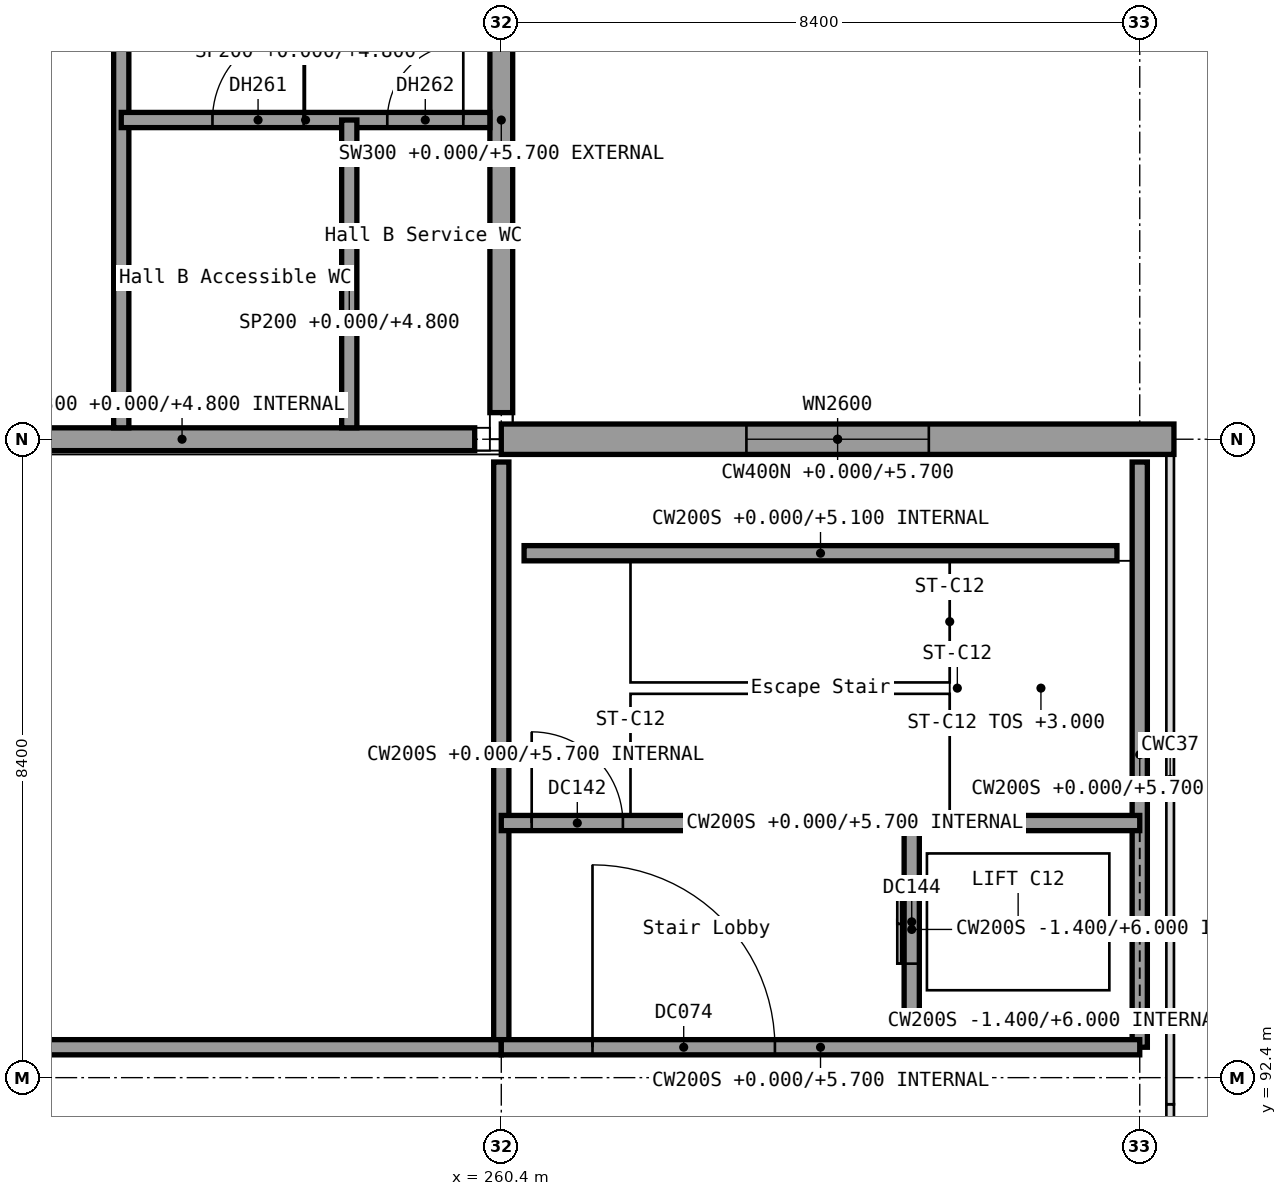
"""IFC4 building model, lengths in metres.
Left out: names, types, materials, properties, quantities, classifications, styles, units other than length and angle.
Written with IfcOpenShell. Run it as: python <this file> out.ifc"""

import sys

from ifc_helpers import new_model, si_unit, direction, frame, frame_2d, origin, origin_2d, place, context, subcontext, project, spatial, rectangle, extrude, element, fill, save


model = new_model("IFC4")
c1 = context("Model", 3, precision=1e-05, world=origin(), true_north=direction((0.0, 1.0)))
c2 = subcontext(c1, "Body", "Model", "MODEL_VIEW")
j1 = project(units=[si_unit("LENGTHUNIT", "METRE"), si_unit("PLANEANGLEUNIT", "RADIAN")], contexts=[c1])
p1 = place(None, origin())
s1 = spatial("IfcSite", under=j1, at=p1, CompositionType="ELEMENT")
p2 = place(p1, origin())
s2 = spatial("IfcBuilding", under=s1, at=p2, CompositionType="ELEMENT")
p3 = place(p2, origin())
s3 = spatial("IfcBuildingStorey", under=s2, at=p3, CompositionType="ELEMENT", Elevation=0.0)
p4 = place(p3, frame((260.4, 100.8, 0.0), z_axis=(0.0, 0.0, 1.0), x_axis=(1.0, 0.0, 0.0)))
e1 = element("IfcColumn", 1, at=p4, inside=s3, PredefinedType="COLUMN", context=c2, shape_type="SweptSolid", body=[
    extrude(rectangle(XDim=0.7, YDim=0.7, at=origin_2d()), origin(), (0.0, 0.0, 1.0), 4.8),
])
p5 = place(p3, frame((252.35, 100.8, 0.0), z_axis=(0.0, 0.0, 1.0), x_axis=(1.0, 0.0, 0.0)))
e2 = element("IfcWall", 2, at=p5, inside=s3, PredefinedType="SOLIDWALL", context=c2, shape_type="SweptSolid", body=[
    extrude(rectangle(XDim=7.7, YDim=0.3, at=frame_2d((3.85, 0.0))), origin(), (0.0, 0.0, 1.0), 4.8),
])
p6 = place(p3, frame((260.4, 101.15, 0.0), z_axis=(0.0, 0.0, 1.0), x_axis=(0.0, 1.0, 0.0)))
e3 = element("IfcWall", 3, at=p6, inside=s3, PredefinedType="SOLIDWALL", context=c2, shape_type="SweptSolid", body=[
    extrude(rectangle(XDim=7.7, YDim=0.3, at=frame_2d((3.85, 0.0))), origin(), (0.0, 0.0, 1.0), 5.7),
])
p7 = place(p3, frame((243.8, 100.8, 6.0), z_axis=(0.0, 0.0, 1.0), x_axis=(1.0, 0.0, 0.0)))
e4 = element("IfcWall", 4, at=p7, inside=s3, PredefinedType="PARAPET", context=c2, shape_type="SweptSolid", body=[
    extrude(rectangle(XDim=16.45, YDim=0.3, at=frame_2d((8.225, 0.0))), origin(), (0.0, 0.0, 1.0), 1.2),
])
p8 = place(p3, frame((260.4, 100.8, 6.0), z_axis=(0.0, 0.0, 1.0), x_axis=(0.0, 1.0, 0.0)))
e5 = element("IfcWall", 5, at=p8, inside=s3, PredefinedType="PARAPET", context=c2, shape_type="SweptSolid", body=[
    extrude(rectangle(XDim=100.8, YDim=0.3, at=frame_2d((50.4, 0.0))), origin(), (0.0, 0.0, 1.0), 1.2),
])
p9 = place(p3, frame((255.4, 100.95, 0.0), z_axis=(0.0, 0.0, 1.0), x_axis=(0.0, 1.0, 0.0)))
e6 = element("IfcWall", 6, at=p9, inside=s3, PredefinedType="PARTITIONING", context=c2, shape_type="SweptSolid", body=[
    extrude(rectangle(XDim=71.25, YDim=0.2, at=frame_2d((35.625, 0.0))), origin(), (0.0, 0.0, 1.0), 4.8),
])
p10 = place(p9, frame((11.825, 0.0, 0.0)))
e7 = element("IfcOpeningElement", 7, at=p10, cuts=e6, PredefinedType="OPENING", context=c2, shape_type="SweptSolid", body=[
    extrude(rectangle(XDim=1.2, YDim=2.1, at=frame_2d((0.6, 1.05))), frame((0.0, 0.1, 0.0), z_axis=(0.0, -1.0, 0.0), x_axis=(1.0, 0.0, 0.0)), (0.0, 0.0, 1.0), 0.2),
])
p11 = place(p9, frame((30.65, 0.0, 0.0)))
e8 = element("IfcOpeningElement", 8, at=p11, cuts=e6, PredefinedType="OPENING", context=c2, shape_type="SweptSolid", body=[
    extrude(rectangle(XDim=1.2, YDim=2.1, at=frame_2d((0.6, 1.05))), frame((0.0, 0.1, 0.0), z_axis=(0.0, -1.0, 0.0), x_axis=(1.0, 0.0, 0.0)), (0.0, 0.0, 1.0), 0.2),
])
p12 = place(p9, frame((47.45, 0.0, 0.0)))
e9 = element("IfcOpeningElement", 9, at=p12, cuts=e6, PredefinedType="OPENING", context=c2, shape_type="SweptSolid", body=[
    extrude(rectangle(XDim=1.2, YDim=2.1, at=frame_2d((0.6, 1.05))), frame((0.0, 0.1, 0.0), z_axis=(0.0, -1.0, 0.0), x_axis=(1.0, 0.0, 0.0)), (0.0, 0.0, 1.0), 0.2),
])
p13 = place(p9, frame((64.25, 0.0, 0.0)))
e10 = element("IfcOpeningElement", 10, at=p13, cuts=e6, PredefinedType="OPENING", context=c2, shape_type="SweptSolid", body=[
    extrude(rectangle(XDim=1.2, YDim=2.1, at=frame_2d((0.6, 1.05))), frame((0.0, 0.1, 0.0), z_axis=(0.0, -1.0, 0.0), x_axis=(1.0, 0.0, 0.0)), (0.0, 0.0, 1.0), 0.2),
])
p14 = place(p3, frame((255.4, 105.0, 0.0), z_axis=(0.0, 0.0, 1.0), x_axis=(1.0, 0.0, 0.0)))
e11 = element("IfcWall", 11, at=p14, inside=s3, PredefinedType="PARTITIONING", context=c2, shape_type="SweptSolid", body=[
    extrude(rectangle(XDim=4.85, YDim=0.2, at=frame_2d((2.425, 0.0))), origin(), (0.0, 0.0, 1.0), 4.8),
])
p15 = place(p14, frame((1.2, 0.0, 0.0)))
e12 = element("IfcOpeningElement", 12, at=p15, cuts=e11, PredefinedType="OPENING", context=c2, shape_type="SweptSolid", body=[
    extrude(rectangle(XDim=1.2, YDim=2.1, at=frame_2d((0.6, 1.05))), frame((0.0, 0.1, 0.0), z_axis=(0.0, -1.0, 0.0), x_axis=(1.0, 0.0, 0.0)), (0.0, 0.0, 1.0), 0.2),
])
p16 = place(p14, frame((3.5, 0.0, 0.0)))
e13 = element("IfcOpeningElement", 13, at=p16, cuts=e11, PredefinedType="OPENING", context=c2, shape_type="SweptSolid", body=[
    extrude(rectangle(XDim=1.0, YDim=2.1, at=frame_2d((0.5, 1.05))), frame((0.0, 0.1, 0.0), z_axis=(0.0, -1.0, 0.0), x_axis=(1.0, 0.0, 0.0)), (0.0, 0.0, 1.0), 0.2),
])
p17 = place(p3, frame((258.4, 100.95, 0.0), z_axis=(0.0, 0.0, 1.0), x_axis=(0.0, 1.0, 0.0)))
e14 = element("IfcWall", 14, at=p17, inside=s3, PredefinedType="PARTITIONING", context=c2, shape_type="SweptSolid", body=[
    extrude(rectangle(XDim=4.05, YDim=0.2, at=frame_2d((2.025, 0.0))), origin(), (0.0, 0.0, 1.0), 4.8),
])
p18 = place(p3, frame((260.4, 92.4, 0.0), z_axis=(0.0, 0.0, 1.0), x_axis=(1.0, 0.0, 0.0)))
e15 = element("IfcColumn", 15, at=p18, inside=s3, PredefinedType="COLUMN", context=c2, shape_type="SweptSolid", body=[
    extrude(rectangle(XDim=0.6, YDim=0.6, at=origin_2d()), origin(), (0.0, 0.0, 1.0), 6.0),
])
p19 = place(p3, frame((268.8, 92.4, 0.0), z_axis=(0.0, 0.0, 1.0), x_axis=(1.0, 0.0, 0.0)))
e16 = element("IfcColumn", 16, at=p19, inside=s3, PredefinedType="COLUMN", context=c2, shape_type="SweptSolid", body=[
    extrude(rectangle(XDim=0.7, YDim=0.7, at=origin_2d()), origin(), (0.0, 0.0, 1.0), 6.0),
])
p20 = place(p3, frame((260.4, 99.6, 0.0), z_axis=(0.0, 0.0, 1.0), x_axis=(1.0, 0.0, 0.0)))
e17 = element("IfcColumn", 17, at=p20, inside=s3, PredefinedType="COLUMN", context=c2, shape_type="SweptSolid", body=[
    extrude(rectangle(XDim=0.6, YDim=0.6, at=origin_2d()), origin(), (0.0, 0.0, 1.0), 6.0),
])
p21 = place(p3, frame((268.8, 99.6, 0.0), z_axis=(0.0, 0.0, 1.0), x_axis=(1.0, 0.0, 0.0)))
e18 = element("IfcColumn", 18, at=p21, inside=s3, PredefinedType="COLUMN", context=c2, shape_type="SweptSolid", body=[
    extrude(rectangle(XDim=0.7, YDim=0.7, at=origin_2d()), origin(), (0.0, 0.0, 1.0), 6.0),
])
for number, where, z_axis, x_axis in (
    (19, (260.4, 100.5, 0.0), (0.0, 0.0, 1.0), (0.0, -1.0, 0.0)),
    (20, (268.8, 100.5, 0.0), (0.0, 0.0, 1.0), (0.0, -1.0, 0.0)),
):
    element("IfcWall", number, at=place(p3, frame(where, z_axis=z_axis, x_axis=x_axis)), inside=s3, PredefinedType="SOLIDWALL", context=c2, shape_type="SweptSolid", body=[
        extrude(rectangle(XDim=7.7, YDim=0.2, at=frame_2d((3.85, 0.0))), origin(), (0.0, 0.0, 1.0), 5.7),
    ])
p22 = place(p3, frame((260.7, 99.3, 0.0), z_axis=(0.0, 0.0, 1.0), x_axis=(1.0, 0.0, 0.0)))
e21 = element("IfcWall", 21, at=p22, inside=s3, PredefinedType="SOLIDWALL", context=c2, shape_type="SweptSolid", body=[
    extrude(rectangle(XDim=7.8, YDim=0.2, at=frame_2d((3.9, 0.0))), origin(), (0.0, 0.0, 1.0), 5.1),
])
p23 = place(p3, frame((260.4, 100.8, 0.0), z_axis=(0.0, 0.0, 1.0), x_axis=(1.0, 0.0, 0.0)))
e22 = element("IfcWall", 22, at=p23, inside=s3, PredefinedType="SOLIDWALL", context=c2, shape_type="SweptSolid", body=[
    extrude(rectangle(XDim=8.85, YDim=0.4, at=frame_2d((4.425, 0.0))), origin(), (0.0, 0.0, 1.0), 5.7),
])
p24 = place(p23, frame((3.225, 0.0, 1.0)))
e23 = element("IfcOpeningElement", 23, at=p24, cuts=e22, PredefinedType="OPENING", context=c2, shape_type="SweptSolid", body=[
    extrude(rectangle(XDim=2.4, YDim=2.4, at=frame_2d((1.2, 1.2))), frame((0.0, 0.2, 0.0), z_axis=(0.0, -1.0, 0.0), x_axis=(1.0, 0.0, 0.0)), (0.0, 0.0, 1.0), 0.4),
])
p25 = place(p3, frame((218.4, 92.8, 0.0), z_axis=(0.0, 0.0, 1.0), x_axis=(1.0, 0.0, 0.0)))
e24 = element("IfcWall", 24, at=p25, inside=s3, PredefinedType="PARTITIONING", context=c2, shape_type="SweptSolid", body=[
    extrude(rectangle(XDim=42.0, YDim=0.2, at=frame_2d((21.0, 0.0))), origin(), (0.0, 0.0, 1.0), 5.7),
])
p26 = place(p25, frame((3.0, 0.0, 0.0)))
e25 = element("IfcOpeningElement", 25, at=p26, cuts=e24, PredefinedType="OPENING", context=c2, shape_type="SweptSolid", body=[
    extrude(rectangle(XDim=2.4, YDim=2.4, at=frame_2d((1.2, 1.2))), frame((0.0, 0.1, 0.0), z_axis=(0.0, -1.0, 0.0), x_axis=(1.0, 0.0, 0.0)), (0.0, 0.0, 1.0), 0.2),
])
p27 = place(p3, frame((260.4, 92.8, 0.0), z_axis=(0.0, 0.0, 1.0), x_axis=(1.0, 0.0, 0.0)))
e26 = element("IfcWall", 26, at=p27, inside=s3, PredefinedType="SOLIDWALL", context=c2, shape_type="SweptSolid", body=[
    extrude(rectangle(XDim=8.4, YDim=0.2, at=frame_2d((4.2, 0.0))), origin(), (0.0, 0.0, 1.0), 5.7),
])
p28 = place(p27, frame((1.2, 0.0, 0.0)))
e27 = element("IfcOpeningElement", 27, at=p28, cuts=e26, PredefinedType="OPENING", context=c2, shape_type="SweptSolid", body=[
    extrude(rectangle(XDim=2.4, YDim=2.4, at=frame_2d((1.2, 1.2))), frame((0.0, 0.1, 0.0), z_axis=(0.0, -1.0, 0.0), x_axis=(1.0, 0.0, 0.0)), (0.0, 0.0, 1.0), 0.2),
])
p29 = place(p3, frame((260.4, 95.75, 0.0), z_axis=(0.0, 0.0, 1.0), x_axis=(1.0, 0.0, 0.0)))
e28 = element("IfcWall", 28, at=p29, inside=s3, PredefinedType="SOLIDWALL", context=c2, shape_type="SweptSolid", body=[
    extrude(rectangle(XDim=8.4, YDim=0.2, at=frame_2d((4.2, 0.0))), origin(), (0.0, 0.0, 1.0), 5.7),
])
p30 = place(p29, frame((0.4, 0.0, 0.0)))
e29 = element("IfcOpeningElement", 29, at=p30, cuts=e28, PredefinedType="OPENING", context=c2, shape_type="SweptSolid", body=[
    extrude(rectangle(XDim=1.2, YDim=2.4, at=frame_2d((0.6, 1.2))), frame((0.0, 0.1, 0.0), z_axis=(0.0, -1.0, 0.0), x_axis=(1.0, 0.0, 0.0)), (0.0, 0.0, 1.0), 0.2),
])
p31 = place(p3, frame((265.8, 93.05, -1.4), z_axis=(0.0, 0.0, 1.0), x_axis=(0.0, 1.0, 0.0)))
e30 = element("IfcWall", 30, at=p31, inside=s3, PredefinedType="SOLIDWALL", context=c2, shape_type="SweptSolid", body=[
    extrude(rectangle(XDim=2.6, YDim=0.2, at=frame_2d((1.3, 0.0))), origin(), (0.0, 0.0, 1.0), 7.4),
])
p32 = place(p31, frame((0.85, 0.0, 1.4)))
e31 = element("IfcOpeningElement", 31, at=p32, cuts=e30, PredefinedType="OPENING", context=c2, shape_type="SweptSolid", body=[
    extrude(rectangle(XDim=1.1, YDim=2.1, at=frame_2d((0.55, 1.05))), frame((0.0, 0.1, 0.0), z_axis=(0.0, -1.0, 0.0), x_axis=(1.0, 0.0, 0.0)), (0.0, 0.0, 1.0), 0.2),
])
p33 = place(p3, frame((265.7, 93.15, -1.4), z_axis=(0.0, 0.0, 1.0), x_axis=(1.0, 0.0, 0.0)))
e32 = element("IfcWall", 32, at=p33, inside=s3, PredefinedType="SOLIDWALL", context=c2, shape_type="SweptSolid", body=[
    extrude(rectangle(XDim=3.1, YDim=0.2, at=frame_2d((1.55, 0.0))), origin(), (0.0, 0.0, 1.0), 7.4),
])
p34 = place(p15, origin())
e33 = element("IfcDoor", 33, at=p34, inside=s3, OperationType="SINGLE_SWING_LEFT", PredefinedType="DOOR", context=c2, shape_type="SweptSolid", body=[
    extrude(rectangle(XDim=1.2, YDim=2.1, at=frame_2d((0.6, 1.05))), frame((0.0, 0.025, 0.0), z_axis=(0.0, -1.0, 0.0), x_axis=(1.0, 0.0, 0.0)), (0.0, 0.0, 1.0), 0.05),
])
fill(e12, e33)
p35 = place(p16, origin())
e34 = element("IfcDoor", 34, at=p35, inside=s3, OperationType="SINGLE_SWING_RIGHT", PredefinedType="DOOR", context=c2, shape_type="SweptSolid", body=[
    extrude(rectangle(XDim=1.0, YDim=2.1, at=frame_2d((0.5, 1.05))), frame((0.0, 0.025, 0.0), z_axis=(0.0, -1.0, 0.0), x_axis=(1.0, 0.0, 0.0)), (0.0, 0.0, 1.0), 0.05),
])
fill(e13, e34)
p36 = place(p24, origin())
e35 = element("IfcWindow", 35, at=p36, inside=s3, PartitioningType="SINGLE_PANEL", PredefinedType="WINDOW", context=c2, shape_type="SweptSolid", body=[
    extrude(rectangle(XDim=2.4, YDim=2.4, at=frame_2d((1.2, 1.2))), frame((0.0, 0.03, 0.0), z_axis=(0.0, -1.0, 0.0), x_axis=(1.0, 0.0, 0.0)), (0.0, 0.0, 1.0), 0.06),
])
fill(e23, e35)
p37 = place(p28, origin())
e36 = element("IfcDoor", 36, at=p37, inside=s3, OperationType="DOUBLE_DOOR_DOUBLE_SWING", PredefinedType="DOOR", context=c2, shape_type="SweptSolid", body=[
    extrude(rectangle(XDim=2.4, YDim=2.4, at=frame_2d((1.2, 1.2))), frame((0.0, 0.025, 0.0), z_axis=(0.0, -1.0, 0.0), x_axis=(1.0, 0.0, 0.0)), (0.0, 0.0, 1.0), 0.05),
])
fill(e27, e36)
p38 = place(p30, origin())
e37 = element("IfcDoor", 37, at=p38, inside=s3, OperationType="SINGLE_SWING_LEFT", PredefinedType="DOOR", context=c2, shape_type="SweptSolid", body=[
    extrude(rectangle(XDim=1.2, YDim=2.4, at=frame_2d((0.6, 1.2))), frame((0.0, 0.025, 0.0), z_axis=(0.0, -1.0, 0.0), x_axis=(1.0, 0.0, 0.0)), (0.0, 0.0, 1.0), 0.05),
])
fill(e29, e37)
p39 = place(p32, origin())
e38 = element("IfcDoor", 38, at=p39, inside=s3, OperationType="DOUBLE_DOOR_SLIDING", PredefinedType="DOOR", context=c2, shape_type="SweptSolid", body=[
    extrude(rectangle(XDim=1.1, YDim=2.1, at=frame_2d((0.55, 1.05))), frame((0.0, 0.025, 0.0), z_axis=(0.0, -1.0, 0.0), x_axis=(1.0, 0.0, 0.0)), (0.0, 0.0, 1.0), 0.05),
])
fill(e31, e38)
save(model, sys.argv[1])
